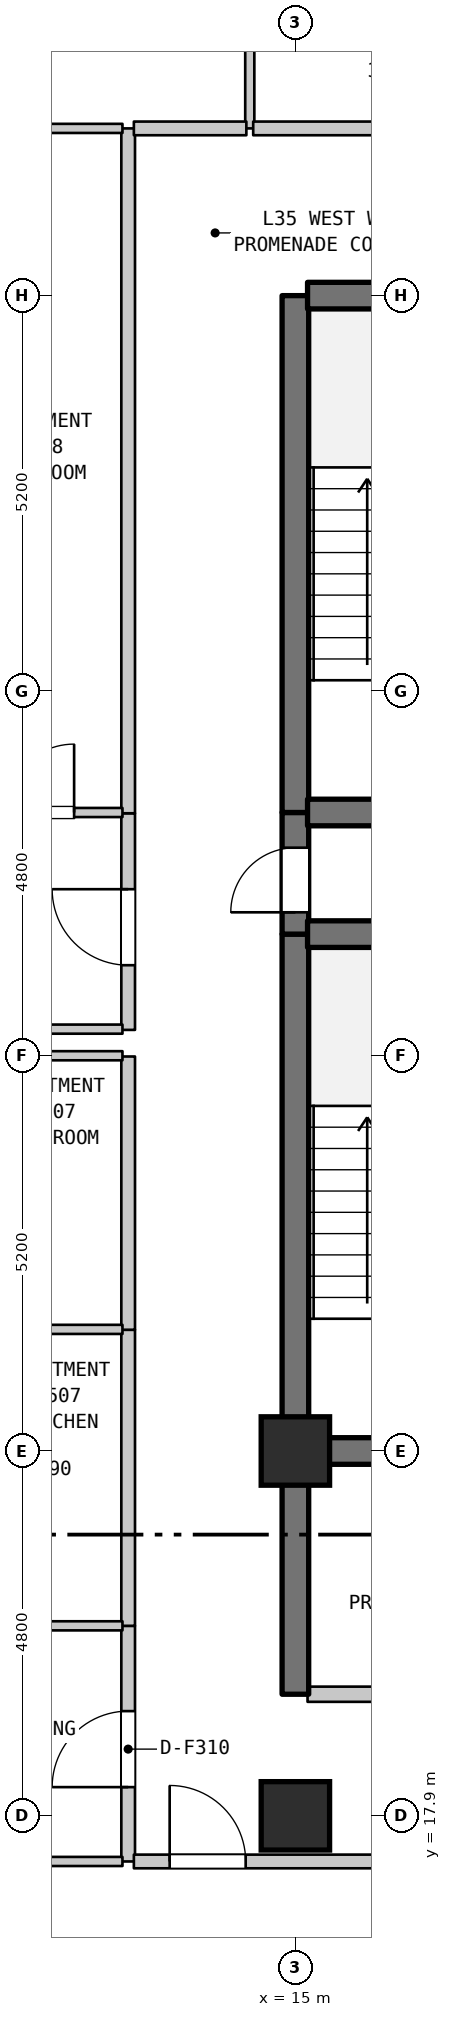
"""IFC4 building model, lengths in metres.
Left out: names, types, materials, properties, quantities, classifications, styles, units other than length and angle.
Written with IfcOpenShell. Run it as: python <this file> out.ifc"""

import sys

from ifc_helpers import new_model, si_unit, direction, frame, frame_2d, origin, origin_2d, place, context, subcontext, project, spatial, rectangle, extrude, element, fill, save


model = new_model("IFC4")
c1 = context("Model", 3, precision=1e-05, world=origin(), true_north=direction((0.0, 1.0)))
c2 = subcontext(c1, "Body", "Model", "MODEL_VIEW")
j1 = project(units=[si_unit("LENGTHUNIT", "METRE"), si_unit("PLANEANGLEUNIT", "RADIAN")], contexts=[c1])
p1 = place(None, origin())
s1 = spatial("IfcSite", under=j1, at=p1, CompositionType="ELEMENT")
p2 = place(p1, origin())
s2 = spatial("IfcBuilding", under=s1, at=p2, CompositionType="ELEMENT")
p3 = place(p2, frame((0.0, 0.0, 144.6)))
s3 = spatial("IfcBuildingStorey", under=s2, at=p3, CompositionType="ELEMENT", Elevation=144.6)
for number, where, z_axis, x_axis in (
    (1, (15.0, 17.9, 0.0), (0.0, 0.0, 1.0), (1.0, 0.0, 0.0)),
    (2, (15.0, 22.7, 0.0), (0.0, 0.0, 1.0), (1.0, 0.0, 0.0)),
):
    element("IfcColumn", number, at=place(p3, frame(where, z_axis=z_axis, x_axis=x_axis)), inside=s3, PredefinedType="COLUMN", context=c2, shape_type="SweptSolid", body=[
        extrude(rectangle(XDim=0.9, YDim=0.9, at=origin_2d()), origin(), (0.0, 0.0, 1.0), 3.7),
    ])
p4 = place(p3, frame((12.8, 17.3, 0.0), z_axis=(0.0, 0.0, 1.0), x_axis=(0.0, 1.0, 0.0)))
e3 = element("IfcWall", 3, at=p4, inside=s3, PredefinedType="STANDARD", context=c2, shape_type="SweptSolid", body=[
    extrude(rectangle(XDim=3.1, YDim=0.18, at=frame_2d((1.55, 0.0))), origin(), (0.0, 0.0, 1.0), 3.385),
])
p5 = place(p4, frame((0.978, 0.0, 0.0)))
e4 = element("IfcOpeningElement", 4, at=p5, cuts=e3, PredefinedType="OPENING", context=c2, shape_type="SweptSolid", body=[
    extrude(rectangle(XDim=1.0, YDim=2.15, at=frame_2d((0.5, 1.075))), frame((0.0, 0.1, 0.0), z_axis=(0.0, -1.0, 0.0), x_axis=(1.0, 0.0, 0.0)), (0.0, 0.0, 1.0), 0.2),
])
p6 = place(p3, frame((12.8, 20.4, 0.0), z_axis=(0.0, 0.0, 1.0), x_axis=(0.0, 1.0, 0.0)))
e5 = element("IfcWall", 5, at=p6, inside=s3, PredefinedType="STANDARD", context=c2, shape_type="SweptSolid", body=[
    extrude(rectangle(XDim=3.895, YDim=0.18, at=frame_2d((1.948, 0.0))), origin(), (0.0, 0.0, 1.0), 3.385),
])
p7 = place(p3, frame((12.8, 24.295, 0.0), z_axis=(0.0, 0.0, 1.0), x_axis=(0.0, 1.0, 0.0)))
e6 = element("IfcWall", 6, at=p7, inside=s3, PredefinedType="STANDARD", context=c2, shape_type="SweptSolid", body=[
    extrude(rectangle(XDim=3.595, YDim=0.18, at=frame_2d((1.797, 0.0))), origin(), (0.0, 0.0, 1.0), 3.385),
])
p8 = place(p3, frame((12.8, 28.24, 0.0), z_axis=(0.0, 0.0, 1.0), x_axis=(0.0, 1.0, 0.0)))
e7 = element("IfcWall", 7, at=p8, inside=s3, PredefinedType="STANDARD", context=c2, shape_type="SweptSolid", body=[
    extrude(rectangle(XDim=2.85, YDim=0.18, at=frame_2d((1.425, 0.0))), origin(), (0.0, 0.0, 1.0), 3.385),
])
p9 = place(p8, frame((0.851, 0.0, 0.0)))
e8 = element("IfcOpeningElement", 8, at=p9, cuts=e7, PredefinedType="OPENING", context=c2, shape_type="SweptSolid", body=[
    extrude(rectangle(XDim=1.0, YDim=2.15, at=frame_2d((0.5, 1.075))), frame((0.0, 0.1, 0.0), z_axis=(0.0, -1.0, 0.0), x_axis=(1.0, 0.0, 0.0)), (0.0, 0.0, 1.0), 0.2),
])
p10 = place(p3, frame((12.8, 31.09, 0.0), z_axis=(0.0, 0.0, 1.0), x_axis=(0.0, 1.0, 0.0)))
e9 = element("IfcWall", 9, at=p10, inside=s3, PredefinedType="STANDARD", context=c2, shape_type="SweptSolid", body=[
    extrude(rectangle(XDim=9.01, YDim=0.18, at=frame_2d((4.505, 0.0))), origin(), (0.0, 0.0, 1.0), 3.385),
])
p11 = place(p3, frame((14.4, 40.1, 0.0), z_axis=(0.0, 0.0, 1.0), x_axis=(0.0, 1.0, 0.0)))
e10 = element("IfcWall", 10, at=p11, inside=s3, PredefinedType="PARTITIONING", context=c2, shape_type="SweptSolid", body=[
    extrude(rectangle(XDim=2.3, YDim=0.12, at=frame_2d((1.15, 0.0))), origin(), (0.0, 0.0, 1.0), 3.385),
])
p12 = place(p3, frame((15.0, 19.5, 0.0), z_axis=(0.0, 0.0, 1.0), x_axis=(0.0, 1.0, 0.0)))
e11 = element("IfcWall", 11, at=p12, inside=s3, PredefinedType="SHEAR", context=c2, shape_type="SweptSolid", body=[
    extrude(rectangle(XDim=3.2, YDim=0.35, at=frame_2d((1.6, 0.0))), origin(), (0.0, 0.0, 1.0), 3.385),
])
p13 = place(p3, frame((15.0, 22.7, 0.0), z_axis=(0.0, 0.0, 1.0), x_axis=(0.0, 1.0, 0.0)))
e12 = element("IfcWall", 12, at=p13, inside=s3, PredefinedType="SHEAR", context=c2, shape_type="SweptSolid", body=[
    extrude(rectangle(XDim=6.8, YDim=0.35, at=frame_2d((3.4, 0.0))), origin(), (0.0, 0.0, 1.0), 3.385),
])
p14 = place(p3, frame((15.0, 29.5, 0.0), z_axis=(0.0, 0.0, 1.0), x_axis=(0.0, 1.0, 0.0)))
e13 = element("IfcWall", 13, at=p14, inside=s3, PredefinedType="SHEAR", context=c2, shape_type="SweptSolid", body=[
    extrude(rectangle(XDim=1.6, YDim=0.35, at=frame_2d((0.8, 0.0))), origin(), (0.0, 0.0, 1.0), 3.385),
])
p15 = place(p14, frame((0.287, 0.0, 0.0)))
e14 = element("IfcOpeningElement", 14, at=p15, cuts=e13, PredefinedType="OPENING", context=c2, shape_type="SweptSolid", body=[
    extrude(rectangle(XDim=0.85, YDim=2.1, at=frame_2d((0.425, 1.05))), frame((0.0, 0.185, 0.0), z_axis=(0.0, -1.0, 0.0), x_axis=(1.0, 0.0, 0.0)), (0.0, 0.0, 1.0), 0.37),
])
p16 = place(p3, frame((15.0, 31.1, 0.0), z_axis=(0.0, 0.0, 1.0), x_axis=(0.0, 1.0, 0.0)))
e15 = element("IfcWall", 15, at=p16, inside=s3, PredefinedType="SHEAR", context=c2, shape_type="SweptSolid", body=[
    extrude(rectangle(XDim=6.8, YDim=0.35, at=frame_2d((3.4, 0.0))), origin(), (0.0, 0.0, 1.0), 3.385),
])
p17 = place(p3, frame((9.085, 17.3, 0.0), z_axis=(0.0, 0.0, 1.0), x_axis=(1.0, 0.0, 0.0)))
e16 = element("IfcWall", 16, at=p17, inside=s3, PredefinedType="PARTITIONING", context=c2, shape_type="SweptSolid", body=[
    extrude(rectangle(XDim=3.64, YDim=0.12, at=frame_2d((1.82, 0.0))), origin(), (0.0, 0.0, 1.0), 3.385),
])
p18 = place(p3, frame((12.875, 17.3, 0.0), z_axis=(0.0, 0.0, 1.0), x_axis=(1.0, 0.0, 0.0)))
e17 = element("IfcWall", 17, at=p18, inside=s3, PredefinedType="STANDARD", context=c2, shape_type="SweptSolid", body=[
    extrude(rectangle(XDim=3.28, YDim=0.18, at=frame_2d((1.64, 0.0))), origin(), (0.0, 0.0, 1.0), 3.385),
])
p19 = place(p18, frame((0.471, 0.0, 0.0)))
e18 = element("IfcOpeningElement", 18, at=p19, cuts=e17, PredefinedType="OPENING", context=c2, shape_type="SweptSolid", body=[
    extrude(rectangle(XDim=1.0, YDim=2.15, at=frame_2d((0.5, 1.075))), frame((0.0, 0.1, 0.0), z_axis=(0.0, -1.0, 0.0), x_axis=(1.0, 0.0, 0.0)), (0.0, 0.0, 1.0), 0.2),
])
p20 = place(p3, frame((15.16, 19.5, 0.0), z_axis=(0.0, 0.0, 1.0), x_axis=(1.0, 0.0, 0.0)))
e19 = element("IfcWall", 19, at=p20, inside=s3, PredefinedType="STANDARD", context=c2, shape_type="SweptSolid", body=[
    extrude(rectangle(XDim=3.68, YDim=0.2, at=frame_2d((1.84, 0.0))), origin(), (0.0, 0.0, 1.0), 3.385),
])
p21 = place(p20, frame((1.39, 0.0, 0.0)))
e20 = element("IfcOpeningElement", 20, at=p21, cuts=e19, PredefinedType="OPENING", context=c2, shape_type="SweptSolid", body=[
    extrude(rectangle(XDim=0.9, YDim=2.15, at=frame_2d((0.45, 1.075))), frame((0.0, 0.11, 0.0), z_axis=(0.0, -1.0, 0.0), x_axis=(1.0, 0.0, 0.0)), (0.0, 0.0, 1.0), 0.22),
])
p22 = place(p3, frame((10.595, 20.4, 0.0), z_axis=(0.0, 0.0, 1.0), x_axis=(1.0, 0.0, 0.0)))
e21 = element("IfcWall", 21, at=p22, inside=s3, PredefinedType="PARTITIONING", context=c2, shape_type="SweptSolid", body=[
    extrude(rectangle(XDim=2.13, YDim=0.12, at=frame_2d((1.065, 0.0))), origin(), (0.0, 0.0, 1.0), 3.385),
])
p23 = place(p3, frame((15.16, 22.7, 0.0), z_axis=(0.0, 0.0, 1.0), x_axis=(1.0, 0.0, 0.0)))
e22 = element("IfcWall", 22, at=p23, inside=s3, PredefinedType="SHEAR", context=c2, shape_type="SweptSolid", body=[
    extrude(rectangle(XDim=3.68, YDim=0.35, at=frame_2d((1.84, 0.0))), origin(), (0.0, 0.0, 1.0), 3.385),
])
for number, where, z_axis, x_axis in (
    (23, (10.595, 24.3, 0.0), (0.0, 0.0, 1.0), (1.0, 0.0, 0.0)),
    (24, (10.595, 27.9, 0.0), (0.0, 0.0, 1.0), (1.0, 0.0, 0.0)),
):
    element("IfcWall", number, at=place(p3, frame(where, z_axis=z_axis, x_axis=x_axis)), inside=s3, PredefinedType="PARTITIONING", context=c2, shape_type="SweptSolid", body=[
        extrude(rectangle(XDim=2.13, YDim=0.12, at=frame_2d((1.065, 0.0))), origin(), (0.0, 0.0, 1.0), 3.385),
    ])
p24 = place(p3, frame((9.03, 28.25, 0.0), z_axis=(0.0, 0.0, 1.0), x_axis=(1.0, 0.0, 0.0)))
e25 = element("IfcWall", 25, at=p24, inside=s3, PredefinedType="PARTITIONING", context=c2, shape_type="SweptSolid", body=[
    extrude(rectangle(XDim=3.695, YDim=0.12, at=frame_2d((1.848, 0.0))), origin(), (0.0, 0.0, 1.0), 3.385),
])
p25 = place(p3, frame((15.16, 29.5, 0.0), z_axis=(0.0, 0.0, 1.0), x_axis=(1.0, 0.0, 0.0)))
e26 = element("IfcWall", 26, at=p25, inside=s3, PredefinedType="SHEAR", context=c2, shape_type="SweptSolid", body=[
    extrude(rectangle(XDim=3.68, YDim=0.35, at=frame_2d((1.84, 0.0))), origin(), (0.0, 0.0, 1.0), 3.385),
])
p26 = place(p3, frame((10.523, 31.1, 0.0), z_axis=(0.0, 0.0, 1.0), x_axis=(1.0, 0.0, 0.0)))
e27 = element("IfcWall", 27, at=p26, inside=s3, PredefinedType="PARTITIONING", context=c2, shape_type="SweptSolid", body=[
    extrude(rectangle(XDim=2.202, YDim=0.12, at=frame_2d((1.101, 0.0))), origin(), (0.0, 0.0, 1.0), 3.385),
])
p27 = place(p26, frame((0.666, 0.0, 0.0)))
e28 = element("IfcOpeningElement", 28, at=p27, cuts=e27, PredefinedType="OPENING", context=c2, shape_type="SweptSolid", body=[
    extrude(rectangle(XDim=0.9, YDim=2.1, at=frame_2d((0.45, 1.05))), frame((0.0, 0.07, 0.0), z_axis=(0.0, -1.0, 0.0), x_axis=(1.0, 0.0, 0.0)), (0.0, 0.0, 1.0), 0.14),
])
for number, where, z_axis, x_axis in (
    (29, (15.16, 31.1, 0.0), (0.0, 0.0, 1.0), (1.0, 0.0, 0.0)),
    (30, (15.16, 37.9, 0.0), (0.0, 0.0, 1.0), (1.0, 0.0, 0.0)),
):
    element("IfcWall", number, at=place(p3, frame(where, z_axis=z_axis, x_axis=x_axis)), inside=s3, PredefinedType="SHEAR", context=c2, shape_type="SweptSolid", body=[
        extrude(rectangle(XDim=3.68, YDim=0.35, at=frame_2d((1.84, 0.0))), origin(), (0.0, 0.0, 1.0), 3.385),
    ])
p28 = place(p3, frame((10.523, 40.1, 0.0), z_axis=(0.0, 0.0, 1.0), x_axis=(1.0, 0.0, 0.0)))
e31 = element("IfcWall", 31, at=p28, inside=s3, PredefinedType="PARTITIONING", context=c2, shape_type="SweptSolid", body=[
    extrude(rectangle(XDim=2.202, YDim=0.12, at=frame_2d((1.101, 0.0))), origin(), (0.0, 0.0, 1.0), 3.385),
])
p29 = place(p3, frame((12.875, 40.1, 0.0), z_axis=(0.0, 0.0, 1.0), x_axis=(1.0, 0.0, 0.0)))
e32 = element("IfcWall", 32, at=p29, inside=s3, PredefinedType="STANDARD", context=c2, shape_type="SweptSolid", body=[
    extrude(rectangle(XDim=1.48, YDim=0.18, at=frame_2d((0.74, 0.0))), origin(), (0.0, 0.0, 1.0), 3.385),
])
p30 = place(p3, frame((14.445, 40.1, 0.0), z_axis=(0.0, 0.0, 1.0), x_axis=(1.0, 0.0, 0.0)))
e33 = element("IfcWall", 33, at=p30, inside=s3, PredefinedType="STANDARD", context=c2, shape_type="SweptSolid", body=[
    extrude(rectangle(XDim=3.489, YDim=0.18, at=frame_2d((1.745, 0.0))), origin(), (0.0, 0.0, 1.0), 3.385),
])
p31 = place(p5, origin())
e34 = element("IfcDoor", 34, at=p31, inside=s3, OperationType="SINGLE_SWING_LEFT", PredefinedType="DOOR", context=c2, shape_type="SweptSolid", body=[
    extrude(rectangle(XDim=1.0, YDim=2.15, at=frame_2d((0.5, 1.075))), frame((0.0, 0.025, 0.0), z_axis=(0.0, -1.0, 0.0), x_axis=(1.0, 0.0, 0.0)), (0.0, 0.0, 1.0), 0.05),
])
fill(e4, e34)
p32 = place(p9, origin())
e35 = element("IfcDoor", 35, at=p32, inside=s3, OperationType="SINGLE_SWING_RIGHT", PredefinedType="DOOR", context=c2, shape_type="SweptSolid", body=[
    extrude(rectangle(XDim=1.0, YDim=2.15, at=frame_2d((0.5, 1.075))), frame((0.0, 0.025, 0.0), z_axis=(0.0, -1.0, 0.0), x_axis=(1.0, 0.0, 0.0)), (0.0, 0.0, 1.0), 0.05),
])
fill(e8, e35)
p33 = place(p15, origin())
e36 = element("IfcDoor", 36, at=p33, inside=s3, OperationType="SINGLE_SWING_LEFT", PredefinedType="DOOR", context=c2, shape_type="SweptSolid", body=[
    extrude(rectangle(XDim=0.85, YDim=2.1, at=frame_2d((0.425, 1.05))), frame((0.0, 0.025, 0.0), z_axis=(0.0, -1.0, 0.0), x_axis=(1.0, 0.0, 0.0)), (0.0, 0.0, 1.0), 0.05),
])
fill(e14, e36)
p34 = place(p19, origin())
e37 = element("IfcDoor", 37, at=p34, inside=s3, OperationType="SINGLE_SWING_LEFT", PredefinedType="DOOR", context=c2, shape_type="SweptSolid", body=[
    extrude(rectangle(XDim=1.0, YDim=2.15, at=frame_2d((0.5, 1.075))), frame((0.0, 0.025, 0.0), z_axis=(0.0, -1.0, 0.0), x_axis=(1.0, 0.0, 0.0)), (0.0, 0.0, 1.0), 0.05),
])
fill(e18, e37)
p35 = place(p27, origin())
e38 = element("IfcDoor", 38, at=p35, inside=s3, OperationType="SINGLE_SWING_RIGHT", PredefinedType="DOOR", context=c2, shape_type="SweptSolid", body=[
    extrude(rectangle(XDim=0.9, YDim=2.1, at=frame_2d((0.45, 1.05))), frame((0.0, 0.025, 0.0), z_axis=(0.0, -1.0, 0.0), x_axis=(1.0, 0.0, 0.0)), (0.0, 0.0, 1.0), 0.05),
])
fill(e28, e38)
save(model, sys.argv[1])
